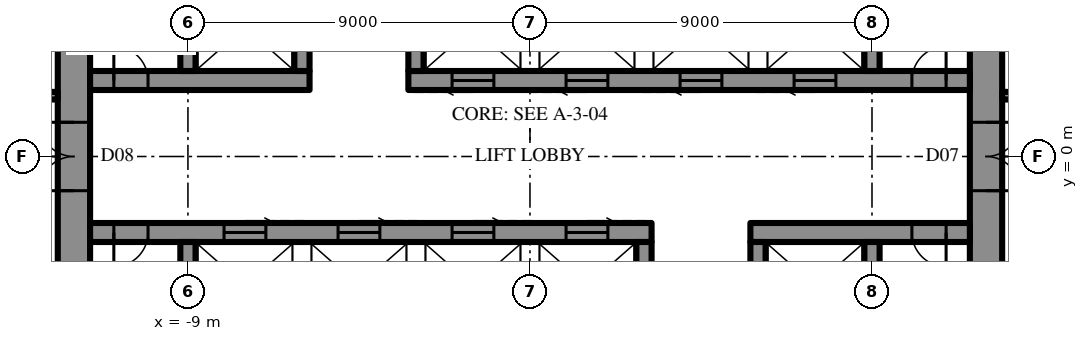
"""IFC4 building model, lengths in metres.
Left out: names, types, materials, properties, quantities, classifications, styles, units other than length and angle.
Written with IfcOpenShell. Run it as: python <this file> out.ifc"""

import sys

from ifc_helpers import new_model, si_unit, direction, frame, frame_2d, origin, place, context, subcontext, project, spatial, rectangle, extrude, element, fill, save


model = new_model("IFC4")
c1 = context("Model", 3, precision=1e-05, world=origin(), true_north=direction((0.0, 1.0)))
c2 = subcontext(c1, "Body", "Model", "MODEL_VIEW")
j1 = project(units=[si_unit("LENGTHUNIT", "METRE"), si_unit("PLANEANGLEUNIT", "RADIAN")], contexts=[c1])
p1 = place(None, origin())
s1 = spatial("IfcSite", under=j1, at=p1, CompositionType="ELEMENT")
p2 = place(p1, origin())
s2 = spatial("IfcBuilding", under=s1, at=p2, CompositionType="ELEMENT")
p3 = place(p2, frame((0.0, 0.0, 315.7)))
s3 = spatial("IfcBuildingStorey", under=s2, at=p3, CompositionType="ELEMENT", Elevation=315.7)
p4 = place(p3, frame((12.0, -10.7, 0.0), z_axis=(0.0, 0.0, 1.0), x_axis=(0.0, 1.0, 0.0)))
e1 = element("IfcWall", 1, at=p4, inside=s3, PredefinedType="SHEAR", context=c2, shape_type="SweptSolid", body=[
    extrude(rectangle(XDim=21.4, YDim=0.85, at=frame_2d((10.7, 0.0))), origin(), (0.0, 0.0, 1.0), 4.2),
])
p5 = place(p4, frame((9.8, 0.0, 0.0)))
e2 = element("IfcOpeningElement", 2, at=p5, cuts=e1, PredefinedType="OPENING", context=c2, shape_type="SweptSolid", body=[
    extrude(rectangle(XDim=1.8, YDim=2.4, at=frame_2d((0.9, 1.2))), frame((0.0, 0.435, 0.0), z_axis=(0.0, -1.0, 0.0), x_axis=(1.0, 0.0, 0.0)), (0.0, 0.0, 1.0), 0.87),
])
p6 = place(p3, frame((-12.0, 10.7, 0.0), z_axis=(0.0, 0.0, 1.0), x_axis=(0.0, -1.0, 0.0)))
e3 = element("IfcWall", 3, at=p6, inside=s3, PredefinedType="SHEAR", context=c2, shape_type="SweptSolid", body=[
    extrude(rectangle(XDim=21.4, YDim=0.85, at=frame_2d((10.7, 0.0))), origin(), (0.0, 0.0, 1.0), 4.2),
])
p7 = place(p6, frame((9.8, 0.0, 0.0)))
e4 = element("IfcOpeningElement", 4, at=p7, cuts=e3, PredefinedType="OPENING", context=c2, shape_type="SweptSolid", body=[
    extrude(rectangle(XDim=1.8, YDim=2.4, at=frame_2d((0.9, 1.2))), frame((0.0, 0.435, 0.0), z_axis=(0.0, -1.0, 0.0), x_axis=(1.0, 0.0, 0.0)), (0.0, 0.0, 1.0), 0.87),
])
p8 = place(p3, frame((-11.575, 2.0, 0.0), z_axis=(0.0, 0.0, 1.0), x_axis=(1.0, 0.0, 0.0)))
e5 = element("IfcWall", 5, at=p8, inside=s3, PredefinedType="SHEAR", context=c2, shape_type="SweptSolid", body=[
    extrude(rectangle(XDim=5.775, YDim=0.5, at=frame_2d((2.887, 0.0))), origin(), (0.0, 0.0, 1.0), 4.2),
])
p9 = place(p8, frame((0.625, 0.0, 0.0)))
e6 = element("IfcOpeningElement", 6, at=p9, cuts=e5, PredefinedType="OPENING", context=c2, shape_type="SweptSolid", body=[
    extrude(rectangle(XDim=0.9, YDim=2.2, at=frame_2d((0.45, 1.1))), frame((0.0, 0.26, 0.0), z_axis=(0.0, -1.0, 0.0), x_axis=(1.0, 0.0, 0.0)), (0.0, 0.0, 1.0), 0.52),
])
p10 = place(p3, frame((-3.2, 2.0, 0.0), z_axis=(0.0, 0.0, 1.0), x_axis=(1.0, 0.0, 0.0)))
e7 = element("IfcWall", 7, at=p10, inside=s3, PredefinedType="SHEAR", context=c2, shape_type="SweptSolid", body=[
    extrude(rectangle(XDim=14.775, YDim=0.5, at=frame_2d((7.387, 0.0))), origin(), (0.0, 0.0, 1.0), 4.2),
])
p11 = place(p10, frame((13.25, 0.0, 0.0)))
e8 = element("IfcOpeningElement", 8, at=p11, cuts=e7, PredefinedType="OPENING", context=c2, shape_type="SweptSolid", body=[
    extrude(rectangle(XDim=0.9, YDim=2.2, at=frame_2d((0.45, 1.1))), frame((0.0, 0.26, 0.0), z_axis=(0.0, -1.0, 0.0), x_axis=(1.0, 0.0, 0.0)), (0.0, 0.0, 1.0), 0.52),
])
p12 = place(p10, frame((1.15, 0.0, 0.0)))
e9 = element("IfcOpeningElement", 9, at=p12, cuts=e7, PredefinedType="OPENING", context=c2, shape_type="SweptSolid", body=[
    extrude(rectangle(XDim=1.1, YDim=2.2, at=frame_2d((0.55, 1.1))), frame((0.0, 0.26, 0.0), z_axis=(0.0, -1.0, 0.0), x_axis=(1.0, 0.0, 0.0)), (0.0, 0.0, 1.0), 0.52),
])
p13 = place(p10, frame((4.15, 0.0, 0.0)))
e10 = element("IfcOpeningElement", 10, at=p13, cuts=e7, PredefinedType="OPENING", context=c2, shape_type="SweptSolid", body=[
    extrude(rectangle(XDim=1.1, YDim=2.2, at=frame_2d((0.55, 1.1))), frame((0.0, 0.26, 0.0), z_axis=(0.0, -1.0, 0.0), x_axis=(1.0, 0.0, 0.0)), (0.0, 0.0, 1.0), 0.52),
])
p14 = place(p10, frame((7.15, 0.0, 0.0)))
e11 = element("IfcOpeningElement", 11, at=p14, cuts=e7, PredefinedType="OPENING", context=c2, shape_type="SweptSolid", body=[
    extrude(rectangle(XDim=1.1, YDim=2.2, at=frame_2d((0.55, 1.1))), frame((0.0, 0.26, 0.0), z_axis=(0.0, -1.0, 0.0), x_axis=(1.0, 0.0, 0.0)), (0.0, 0.0, 1.0), 0.52),
])
p15 = place(p10, frame((10.15, 0.0, 0.0)))
e12 = element("IfcOpeningElement", 12, at=p15, cuts=e7, PredefinedType="OPENING", context=c2, shape_type="SweptSolid", body=[
    extrude(rectangle(XDim=1.1, YDim=2.2, at=frame_2d((0.55, 1.1))), frame((0.0, 0.26, 0.0), z_axis=(0.0, -1.0, 0.0), x_axis=(1.0, 0.0, 0.0)), (0.0, 0.0, 1.0), 0.52),
])
for number, where, z_axis, x_axis in (
    (13, (-9.0, 2.25, 0.0), (0.0, 0.0, 1.0), (0.0, 1.0, 0.0)),
    (14, (-6.0, 2.25, 0.0), (0.0, 0.0, 1.0), (0.0, 1.0, 0.0)),
    (15, (-3.0, 2.25, 0.0), (0.0, 0.0, 1.0), (0.0, 1.0, 0.0)),
    (16, (9.0, 2.25, 0.0), (0.0, 0.0, 1.0), (0.0, 1.0, 0.0)),
):
    element("IfcWall", number, at=place(p3, frame(where, z_axis=z_axis, x_axis=x_axis)), inside=s3, PredefinedType="SHEAR", context=c2, shape_type="SweptSolid", body=[
        extrude(rectangle(XDim=2.3, YDim=0.4, at=frame_2d((1.15, 0.0))), origin(), (0.0, 0.0, 1.0), 4.2),
    ])
p16 = place(p3, frame((11.575, -2.0, 0.0), z_axis=(0.0, 0.0, 1.0), x_axis=(-1.0, 0.0, 0.0)))
e17 = element("IfcWall", 17, at=p16, inside=s3, PredefinedType="SHEAR", context=c2, shape_type="SweptSolid", body=[
    extrude(rectangle(XDim=5.775, YDim=0.5, at=frame_2d((2.887, 0.0))), origin(), (0.0, 0.0, 1.0), 4.2),
])
p17 = place(p16, frame((0.625, 0.0, 0.0)))
e18 = element("IfcOpeningElement", 18, at=p17, cuts=e17, PredefinedType="OPENING", context=c2, shape_type="SweptSolid", body=[
    extrude(rectangle(XDim=0.9, YDim=2.2, at=frame_2d((0.45, 1.1))), frame((0.0, 0.26, 0.0), z_axis=(0.0, -1.0, 0.0), x_axis=(1.0, 0.0, 0.0)), (0.0, 0.0, 1.0), 0.52),
])
p18 = place(p3, frame((3.2, -2.0, 0.0), z_axis=(0.0, 0.0, 1.0), x_axis=(-1.0, 0.0, 0.0)))
e19 = element("IfcWall", 19, at=p18, inside=s3, PredefinedType="SHEAR", context=c2, shape_type="SweptSolid", body=[
    extrude(rectangle(XDim=14.775, YDim=0.5, at=frame_2d((7.387, 0.0))), origin(), (0.0, 0.0, 1.0), 4.2),
])
p19 = place(p18, frame((13.25, 0.0, 0.0)))
e20 = element("IfcOpeningElement", 20, at=p19, cuts=e19, PredefinedType="OPENING", context=c2, shape_type="SweptSolid", body=[
    extrude(rectangle(XDim=0.9, YDim=2.2, at=frame_2d((0.45, 1.1))), frame((0.0, 0.26, 0.0), z_axis=(0.0, -1.0, 0.0), x_axis=(1.0, 0.0, 0.0)), (0.0, 0.0, 1.0), 0.52),
])
p20 = place(p18, frame((1.15, 0.0, 0.0)))
e21 = element("IfcOpeningElement", 21, at=p20, cuts=e19, PredefinedType="OPENING", context=c2, shape_type="SweptSolid", body=[
    extrude(rectangle(XDim=1.1, YDim=2.2, at=frame_2d((0.55, 1.1))), frame((0.0, 0.26, 0.0), z_axis=(0.0, -1.0, 0.0), x_axis=(1.0, 0.0, 0.0)), (0.0, 0.0, 1.0), 0.52),
])
p21 = place(p18, frame((4.15, 0.0, 0.0)))
e22 = element("IfcOpeningElement", 22, at=p21, cuts=e19, PredefinedType="OPENING", context=c2, shape_type="SweptSolid", body=[
    extrude(rectangle(XDim=1.1, YDim=2.2, at=frame_2d((0.55, 1.1))), frame((0.0, 0.26, 0.0), z_axis=(0.0, -1.0, 0.0), x_axis=(1.0, 0.0, 0.0)), (0.0, 0.0, 1.0), 0.52),
])
p22 = place(p18, frame((7.15, 0.0, 0.0)))
e23 = element("IfcOpeningElement", 23, at=p22, cuts=e19, PredefinedType="OPENING", context=c2, shape_type="SweptSolid", body=[
    extrude(rectangle(XDim=1.1, YDim=2.2, at=frame_2d((0.55, 1.1))), frame((0.0, 0.26, 0.0), z_axis=(0.0, -1.0, 0.0), x_axis=(1.0, 0.0, 0.0)), (0.0, 0.0, 1.0), 0.52),
])
p23 = place(p18, frame((10.15, 0.0, 0.0)))
e24 = element("IfcOpeningElement", 24, at=p23, cuts=e19, PredefinedType="OPENING", context=c2, shape_type="SweptSolid", body=[
    extrude(rectangle(XDim=1.1, YDim=2.2, at=frame_2d((0.55, 1.1))), frame((0.0, 0.26, 0.0), z_axis=(0.0, -1.0, 0.0), x_axis=(1.0, 0.0, 0.0)), (0.0, 0.0, 1.0), 0.52),
])
for number, where, z_axis, x_axis in (
    (25, (9.0, -2.25, 0.0), (0.0, 0.0, 1.0), (0.0, -1.0, 0.0)),
    (26, (6.0, -2.25, 0.0), (0.0, 0.0, 1.0), (0.0, -1.0, 0.0)),
    (27, (3.0, -2.25, 0.0), (0.0, 0.0, 1.0), (0.0, -1.0, 0.0)),
    (28, (-9.0, -2.25, 0.0), (0.0, 0.0, 1.0), (0.0, -1.0, 0.0)),
):
    element("IfcWall", number, at=place(p3, frame(where, z_axis=z_axis, x_axis=x_axis)), inside=s3, PredefinedType="SHEAR", context=c2, shape_type="SweptSolid", body=[
        extrude(rectangle(XDim=2.3, YDim=0.4, at=frame_2d((1.15, 0.0))), origin(), (0.0, 0.0, 1.0), 4.2),
    ])
p24 = place(p3, frame((12.425, 1.6, 0.0), z_axis=(0.0, 0.0, 1.0), x_axis=(1.0, 0.0, 0.0)))
e29 = element("IfcWall", 29, at=p24, inside=s3, PredefinedType="PARTITIONING", context=c2, shape_type="SweptSolid", body=[
    extrude(rectangle(XDim=16.327, YDim=0.2, at=frame_2d((8.164, 0.0))), origin(), (0.0, 0.0, 1.0), 4.0),
])
p25 = place(p24, frame((1.133, 0.0, 0.0)))
e30 = element("IfcOpeningElement", 30, at=p25, cuts=e29, PredefinedType="OPENING", context=c2, shape_type="SweptSolid", body=[
    extrude(rectangle(XDim=1.0, YDim=2.2, at=frame_2d((0.5, 1.1))), frame((0.0, 0.11, 0.0), z_axis=(0.0, -1.0, 0.0), x_axis=(1.0, 0.0, 0.0)), (0.0, 0.0, 1.0), 0.22),
])
p26 = place(p3, frame((-12.425, 1.6, 0.0), z_axis=(0.0, 0.0, 1.0), x_axis=(-1.0, 0.0, 0.0)))
e31 = element("IfcWall", 31, at=p26, inside=s3, PredefinedType="PARTITIONING", context=c2, shape_type="SweptSolid", body=[
    extrude(rectangle(XDim=16.327, YDim=0.2, at=frame_2d((8.164, 0.0))), origin(), (0.0, 0.0, 1.0), 4.0),
])
p27 = place(p26, frame((1.133, 0.0, 0.0)))
e32 = element("IfcOpeningElement", 32, at=p27, cuts=e31, PredefinedType="OPENING", context=c2, shape_type="SweptSolid", body=[
    extrude(rectangle(XDim=1.0, YDim=2.2, at=frame_2d((0.5, 1.1))), frame((0.0, 0.11, 0.0), z_axis=(0.0, -1.0, 0.0), x_axis=(1.0, 0.0, 0.0)), (0.0, 0.0, 1.0), 0.22),
])
p28 = place(p5, frame((1.8, 0.0, 0.0), z_axis=(0.0, 0.0, 1.0), x_axis=(-1.0, 0.0, 0.0)))
e33 = element("IfcDoor", 33, at=p28, inside=s3, OperationType="DOUBLE_DOOR_SINGLE_SWING", PredefinedType="DOOR", context=c2, shape_type="SweptSolid", body=[
    extrude(rectangle(XDim=1.8, YDim=2.4, at=frame_2d((0.9, 1.2))), frame((0.0, 0.025, 0.0), z_axis=(0.0, -1.0, 0.0), x_axis=(1.0, 0.0, 0.0)), (0.0, 0.0, 1.0), 0.05),
])
fill(e2, e33)
p29 = place(p7, frame((1.8, 0.0, 0.0), z_axis=(0.0, 0.0, 1.0), x_axis=(-1.0, 0.0, 0.0)))
e34 = element("IfcDoor", 34, at=p29, inside=s3, OperationType="DOUBLE_DOOR_SINGLE_SWING", PredefinedType="DOOR", context=c2, shape_type="SweptSolid", body=[
    extrude(rectangle(XDim=1.8, YDim=2.4, at=frame_2d((0.9, 1.2))), frame((0.0, 0.025, 0.0), z_axis=(0.0, -1.0, 0.0), x_axis=(1.0, 0.0, 0.0)), (0.0, 0.0, 1.0), 0.05),
])
fill(e4, e34)
p30 = place(p9, origin())
e35 = element("IfcDoor", 35, at=p30, inside=s3, OperationType="SINGLE_SWING_RIGHT", PredefinedType="DOOR", context=c2, shape_type="SweptSolid", body=[
    extrude(rectangle(XDim=0.9, YDim=2.2, at=frame_2d((0.45, 1.1))), frame((0.0, 0.025, 0.0), z_axis=(0.0, -1.0, 0.0), x_axis=(1.0, 0.0, 0.0)), (0.0, 0.0, 1.0), 0.05),
])
fill(e6, e35)
p31 = place(p11, origin())
e36 = element("IfcDoor", 36, at=p31, inside=s3, OperationType="SINGLE_SWING_LEFT", PredefinedType="DOOR", context=c2, shape_type="SweptSolid", body=[
    extrude(rectangle(XDim=0.9, YDim=2.2, at=frame_2d((0.45, 1.1))), frame((0.0, 0.025, 0.0), z_axis=(0.0, -1.0, 0.0), x_axis=(1.0, 0.0, 0.0)), (0.0, 0.0, 1.0), 0.05),
])
fill(e8, e36)
p32 = place(p17, origin())
e37 = element("IfcDoor", 37, at=p32, inside=s3, OperationType="SINGLE_SWING_RIGHT", PredefinedType="DOOR", context=c2, shape_type="SweptSolid", body=[
    extrude(rectangle(XDim=0.9, YDim=2.2, at=frame_2d((0.45, 1.1))), frame((0.0, 0.025, 0.0), z_axis=(0.0, -1.0, 0.0), x_axis=(1.0, 0.0, 0.0)), (0.0, 0.0, 1.0), 0.05),
])
fill(e18, e37)
p33 = place(p19, origin())
e38 = element("IfcDoor", 38, at=p33, inside=s3, OperationType="SINGLE_SWING_LEFT", PredefinedType="DOOR", context=c2, shape_type="SweptSolid", body=[
    extrude(rectangle(XDim=0.9, YDim=2.2, at=frame_2d((0.45, 1.1))), frame((0.0, 0.025, 0.0), z_axis=(0.0, -1.0, 0.0), x_axis=(1.0, 0.0, 0.0)), (0.0, 0.0, 1.0), 0.05),
])
fill(e20, e38)
p34 = place(p12, frame((1.1, 0.0, 0.0), z_axis=(0.0, 0.0, 1.0), x_axis=(-1.0, 0.0, 0.0)))
e39 = element("IfcDoor", 39, at=p34, inside=s3, OperationType="SLIDING_TO_LEFT", PredefinedType="DOOR", context=c2, shape_type="SweptSolid", body=[
    extrude(rectangle(XDim=1.1, YDim=2.2, at=frame_2d((0.55, 1.1))), frame((0.0, 0.025, 0.0), z_axis=(0.0, -1.0, 0.0), x_axis=(1.0, 0.0, 0.0)), (0.0, 0.0, 1.0), 0.05),
])
fill(e9, e39)
p35 = place(p13, frame((1.1, 0.0, 0.0), z_axis=(0.0, 0.0, 1.0), x_axis=(-1.0, 0.0, 0.0)))
e40 = element("IfcDoor", 40, at=p35, inside=s3, OperationType="SLIDING_TO_LEFT", PredefinedType="DOOR", context=c2, shape_type="SweptSolid", body=[
    extrude(rectangle(XDim=1.1, YDim=2.2, at=frame_2d((0.55, 1.1))), frame((0.0, 0.025, 0.0), z_axis=(0.0, -1.0, 0.0), x_axis=(1.0, 0.0, 0.0)), (0.0, 0.0, 1.0), 0.05),
])
fill(e10, e40)
p36 = place(p14, frame((1.1, 0.0, 0.0), z_axis=(0.0, 0.0, 1.0), x_axis=(-1.0, 0.0, 0.0)))
e41 = element("IfcDoor", 41, at=p36, inside=s3, OperationType="SLIDING_TO_LEFT", PredefinedType="DOOR", context=c2, shape_type="SweptSolid", body=[
    extrude(rectangle(XDim=1.1, YDim=2.2, at=frame_2d((0.55, 1.1))), frame((0.0, 0.025, 0.0), z_axis=(0.0, -1.0, 0.0), x_axis=(1.0, 0.0, 0.0)), (0.0, 0.0, 1.0), 0.05),
])
fill(e11, e41)
p37 = place(p15, frame((1.1, 0.0, 0.0), z_axis=(0.0, 0.0, 1.0), x_axis=(-1.0, 0.0, 0.0)))
e42 = element("IfcDoor", 42, at=p37, inside=s3, OperationType="SLIDING_TO_LEFT", PredefinedType="DOOR", context=c2, shape_type="SweptSolid", body=[
    extrude(rectangle(XDim=1.1, YDim=2.2, at=frame_2d((0.55, 1.1))), frame((0.0, 0.025, 0.0), z_axis=(0.0, -1.0, 0.0), x_axis=(1.0, 0.0, 0.0)), (0.0, 0.0, 1.0), 0.05),
])
fill(e12, e42)
p38 = place(p20, frame((1.1, 0.0, 0.0), z_axis=(0.0, 0.0, 1.0), x_axis=(-1.0, 0.0, 0.0)))
e43 = element("IfcDoor", 43, at=p38, inside=s3, OperationType="SLIDING_TO_LEFT", PredefinedType="DOOR", context=c2, shape_type="SweptSolid", body=[
    extrude(rectangle(XDim=1.1, YDim=2.2, at=frame_2d((0.55, 1.1))), frame((0.0, 0.025, 0.0), z_axis=(0.0, -1.0, 0.0), x_axis=(1.0, 0.0, 0.0)), (0.0, 0.0, 1.0), 0.05),
])
fill(e21, e43)
p39 = place(p21, frame((1.1, 0.0, 0.0), z_axis=(0.0, 0.0, 1.0), x_axis=(-1.0, 0.0, 0.0)))
e44 = element("IfcDoor", 44, at=p39, inside=s3, OperationType="SLIDING_TO_LEFT", PredefinedType="DOOR", context=c2, shape_type="SweptSolid", body=[
    extrude(rectangle(XDim=1.1, YDim=2.2, at=frame_2d((0.55, 1.1))), frame((0.0, 0.025, 0.0), z_axis=(0.0, -1.0, 0.0), x_axis=(1.0, 0.0, 0.0)), (0.0, 0.0, 1.0), 0.05),
])
fill(e22, e44)
p40 = place(p22, frame((1.1, 0.0, 0.0), z_axis=(0.0, 0.0, 1.0), x_axis=(-1.0, 0.0, 0.0)))
e45 = element("IfcDoor", 45, at=p40, inside=s3, OperationType="SLIDING_TO_LEFT", PredefinedType="DOOR", context=c2, shape_type="SweptSolid", body=[
    extrude(rectangle(XDim=1.1, YDim=2.2, at=frame_2d((0.55, 1.1))), frame((0.0, 0.025, 0.0), z_axis=(0.0, -1.0, 0.0), x_axis=(1.0, 0.0, 0.0)), (0.0, 0.0, 1.0), 0.05),
])
fill(e23, e45)
p41 = place(p23, frame((1.1, 0.0, 0.0), z_axis=(0.0, 0.0, 1.0), x_axis=(-1.0, 0.0, 0.0)))
e46 = element("IfcDoor", 46, at=p41, inside=s3, OperationType="SLIDING_TO_LEFT", PredefinedType="DOOR", context=c2, shape_type="SweptSolid", body=[
    extrude(rectangle(XDim=1.1, YDim=2.2, at=frame_2d((0.55, 1.1))), frame((0.0, 0.025, 0.0), z_axis=(0.0, -1.0, 0.0), x_axis=(1.0, 0.0, 0.0)), (0.0, 0.0, 1.0), 0.05),
])
fill(e24, e46)
save(model, sys.argv[1])
